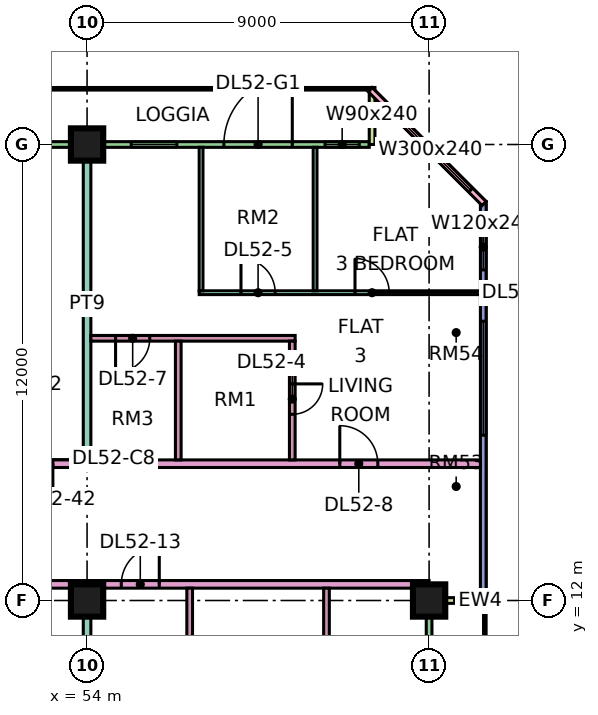
"""IFC4 building model, lengths in metres.
Left out: names, types, materials, properties, quantities, classifications, styles, units other than length and angle.
Written with IfcOpenShell. Run it as: python <this file> out.ifc"""

import sys

from ifc_helpers import new_model, si_unit, direction, frame, frame_2d, origin, origin_2d, place, context, subcontext, project, spatial, rectangle, extrude, element, fill, save


model = new_model("IFC4")
c1 = context("Model", 3, precision=1e-05, world=origin(), true_north=direction((0.0, 1.0)))
c2 = subcontext(c1, "Body", "Model", "MODEL_VIEW")
j1 = project(units=[si_unit("LENGTHUNIT", "METRE"), si_unit("PLANEANGLEUNIT", "RADIAN")], contexts=[c1])
p1 = place(None, origin())
s1 = spatial("IfcSite", under=j1, at=p1, CompositionType="ELEMENT")
p2 = place(p1, origin())
s2 = spatial("IfcBuilding", under=s1, at=p2, CompositionType="ELEMENT")
p3 = place(p2, frame((0.0, 0.0, 222.9)))
s3 = spatial("IfcBuildingStorey", under=s2, at=p3, CompositionType="ELEMENT", Elevation=222.9)
for number, where, z_axis, x_axis in (
    (1, (54.0, 12.0, 0.0), (0.0, 0.0, 1.0), (1.0, 0.0, 0.0)),
    (2, (54.0, 24.0, 0.0), (0.0, 0.0, 1.0), (1.0, 0.0, 0.0)),
    (3, (63.0, 12.0, 0.0), (0.0, 0.0, 1.0), (1.0, 0.0, 0.0)),
):
    element("IfcColumn", number, at=place(p3, frame(where, z_axis=z_axis, x_axis=x_axis)), inside=s3, PredefinedType="COLUMN", context=c2, shape_type="SweptSolid", body=[
        extrude(rectangle(XDim=0.85, YDim=0.85, at=origin_2d()), origin(), (0.0, 0.0, 1.0), 3.75),
    ])
p4 = place(p3, frame((61.425, 24.0, 0.0), z_axis=(0.0, 0.0, 1.0), x_axis=(-1.0, 0.0, 0.0)))
e4 = element("IfcWall", 4, at=p4, inside=s3, PredefinedType="SOLIDWALL", context=c2, shape_type="SweptSolid", body=[
    extrude(rectangle(XDim=13.35, YDim=0.15, at=frame_2d((6.675, 0.0))), origin(), (0.0, 0.0, 1.0), 3.35),
])
p5 = place(p4, frame((0.262, 0.0, 0.45)))
e5 = element("IfcOpeningElement", 5, at=p5, cuts=e4, PredefinedType="OPENING", context=c2, shape_type="SweptSolid", body=[
    extrude(rectangle(XDim=0.9, YDim=2.4, at=frame_2d((0.45, 1.2))), frame((0.0, 0.085, 0.0), z_axis=(0.0, -1.0, 0.0), x_axis=(1.0, 0.0, 0.0)), (0.0, 0.0, 1.0), 0.17),
])
p6 = place(p4, frame((2.025, 0.0, 0.0)))
e6 = element("IfcOpeningElement", 6, at=p6, cuts=e4, PredefinedType="OPENING", context=c2, shape_type="SweptSolid", body=[
    extrude(rectangle(XDim=1.8, YDim=2.4, at=frame_2d((0.9, 1.2))), frame((0.0, 0.085, 0.0), z_axis=(0.0, -1.0, 0.0), x_axis=(1.0, 0.0, 0.0)), (0.0, 0.0, 1.0), 0.17),
])
p7 = place(p4, frame((5.062, 0.0, 0.45)))
e7 = element("IfcOpeningElement", 7, at=p7, cuts=e4, PredefinedType="OPENING", context=c2, shape_type="SweptSolid", body=[
    extrude(rectangle(XDim=1.2, YDim=2.4, at=frame_2d((0.6, 1.2))), frame((0.0, 0.085, 0.0), z_axis=(0.0, -1.0, 0.0), x_axis=(1.0, 0.0, 0.0)), (0.0, 0.0, 1.0), 0.17),
])
p8 = place(p4, frame((8.55, 0.0, 0.45)))
e8 = element("IfcOpeningElement", 8, at=p8, cuts=e4, PredefinedType="OPENING", context=c2, shape_type="SweptSolid", body=[
    extrude(rectangle(XDim=4.2, YDim=2.4, at=frame_2d((2.1, 1.2))), frame((0.0, 0.085, 0.0), z_axis=(0.0, -1.0, 0.0), x_axis=(1.0, 0.0, 0.0)), (0.0, 0.0, 1.0), 0.17),
])
p9 = place(p3, frame((61.5, 25.5, 0.0), z_axis=(0.0, 0.0, 1.0), x_axis=(0.0, -1.0, 0.0)))
e9 = element("IfcWall", 9, at=p9, inside=s3, PredefinedType="SOLIDWALL", context=c2, shape_type="SweptSolid", body=[
    extrude(rectangle(XDim=1.5, YDim=0.15, at=frame_2d((0.75, 0.0))), origin(), (0.0, 0.0, 1.0), 3.35),
])
p10 = place(p3, frame((63.0, 1.575, 0.0), z_axis=(0.0, 0.0, 1.0), x_axis=(0.0, 1.0, 0.0)))
e10 = element("IfcWall", 10, at=p10, inside=s3, PredefinedType="SOLIDWALL", context=c2, shape_type="SweptSolid", body=[
    extrude(rectangle(XDim=10.35, YDim=0.15, at=frame_2d((5.175, 0.0))), origin(), (0.0, 0.0, 1.0), 3.35),
])
p11 = place(p10, frame((1.825, 0.0, 0.0)))
e11 = element("IfcOpeningElement", 11, at=p11, cuts=e10, PredefinedType="OPENING", context=c2, shape_type="SweptSolid", body=[
    extrude(rectangle(XDim=1.8, YDim=2.4, at=frame_2d((0.9, 1.2))), frame((0.0, 0.085, 0.0), z_axis=(0.0, -1.0, 0.0), x_axis=(1.0, 0.0, 0.0)), (0.0, 0.0, 1.0), 0.17),
])
p12 = place(p10, frame((7.075, 0.0, 0.45)))
e12 = element("IfcOpeningElement", 12, at=p12, cuts=e10, PredefinedType="OPENING", context=c2, shape_type="SweptSolid", body=[
    extrude(rectangle(XDim=2.4, YDim=2.4, at=frame_2d((1.2, 1.2))), frame((0.0, 0.085, 0.0), z_axis=(0.0, -1.0, 0.0), x_axis=(1.0, 0.0, 0.0)), (0.0, 0.0, 1.0), 0.17),
])
p13 = place(p3, frame((64.5, 12.0, 0.0), z_axis=(0.0, 0.0, 1.0), x_axis=(-1.0, 0.0, 0.0)))
e13 = element("IfcWall", 13, at=p13, inside=s3, PredefinedType="SOLIDWALL", context=c2, shape_type="SweptSolid", body=[
    extrude(rectangle(XDim=1.5, YDim=0.15, at=frame_2d((0.75, 0.0))), origin(), (0.0, 0.0, 1.0), 3.35),
])
p14 = place(p3, frame((64.425, 12.075, 0.0), z_axis=(0.0, 0.0, 1.0), x_axis=(0.0, 1.0, 0.0)))
e14 = element("IfcWall", 14, at=p14, inside=s3, PredefinedType="SOLIDWALL", context=c2, shape_type="SweptSolid", body=[
    extrude(rectangle(XDim=10.425, YDim=0.15, at=frame_2d((5.212, 0.0))), origin(), (0.0, 0.0, 1.0), 3.35),
])
p15 = place(p14, frame((4.275, 0.0, 0.45)))
e15 = element("IfcOpeningElement", 15, at=p15, cuts=e14, PredefinedType="OPENING", context=c2, shape_type="SweptSolid", body=[
    extrude(rectangle(XDim=3.0, YDim=2.4, at=frame_2d((1.5, 1.2))), frame((0.0, 0.085, 0.0), z_axis=(0.0, -1.0, 0.0), x_axis=(1.0, 0.0, 0.0)), (0.0, 0.0, 1.0), 0.17),
])
p16 = place(p14, frame((8.625, 0.0, 0.45)))
e16 = element("IfcOpeningElement", 16, at=p16, cuts=e14, PredefinedType="OPENING", context=c2, shape_type="SweptSolid", body=[
    extrude(rectangle(XDim=1.2, YDim=2.4, at=frame_2d((0.6, 1.2))), frame((0.0, 0.085, 0.0), z_axis=(0.0, -1.0, 0.0), x_axis=(1.0, 0.0, 0.0)), (0.0, 0.0, 1.0), 0.17),
])
p17 = place(p3, frame((64.447, 22.447, 0.0), z_axis=(0.0, 0.0, 1.0), x_axis=(-0.707106781187, 0.707106781187, 0.0)))
e17 = element("IfcWall", 17, at=p17, inside=s3, PredefinedType="SOLIDWALL", context=c2, shape_type="SweptSolid", body=[
    extrude(rectangle(XDim=4.243, YDim=0.15, at=frame_2d((2.121, 0.0))), origin(), (0.0, 0.0, 1.0), 3.35),
])
p18 = place(p17, frame((0.498, 0.0, 0.45)))
e18 = element("IfcOpeningElement", 18, at=p18, cuts=e17, PredefinedType="OPENING", context=c2, shape_type="SweptSolid", body=[
    extrude(rectangle(XDim=3.0, YDim=2.4, at=frame_2d((1.5, 1.2))), frame((0.0, 0.085, 0.0), z_axis=(0.0, -1.0, 0.0), x_axis=(1.0, 0.0, 0.0)), (0.0, 0.0, 1.0), 0.17),
])
p19 = place(p3, frame((40.65, 12.425, 0.0), z_axis=(0.0, 0.0, 1.0), x_axis=(1.0, 0.0, 0.0)))
e19 = element("IfcWall", 19, at=p19, inside=s3, PredefinedType="PARTITIONING", context=c2, shape_type="SweptSolid", body=[
    extrude(rectangle(XDim=22.35, YDim=0.2, at=frame_2d((11.175, 0.0))), origin(), (0.0, 0.0, 1.0), 3.35),
])
p20 = place(p19, frame((14.25, 0.0, 0.0)))
e20 = element("IfcOpeningElement", 20, at=p20, cuts=e19, PredefinedType="OPENING", context=c2, shape_type="SweptSolid", body=[
    extrude(rectangle(XDim=1.0, YDim=2.1, at=frame_2d((0.5, 1.05))), frame((0.0, 0.11, 0.0), z_axis=(0.0, -1.0, 0.0), x_axis=(1.0, 0.0, 0.0)), (0.0, 0.0, 1.0), 0.22),
])
p21 = place(p19, frame((1.05, 0.0, 0.0)))
e21 = element("IfcOpeningElement", 21, at=p21, cuts=e19, PredefinedType="OPENING", context=c2, shape_type="SweptSolid", body=[
    extrude(rectangle(XDim=1.0, YDim=2.1, at=frame_2d((0.5, 1.05))), frame((0.0, 0.11, 0.0), z_axis=(0.0, -1.0, 0.0), x_axis=(1.0, 0.0, 0.0)), (0.0, 0.0, 1.0), 0.22),
])
p22 = place(p3, frame((51.225, 15.6, 0.0), z_axis=(0.0, 0.0, 1.0), x_axis=(1.0, 0.0, 0.0)))
e22 = element("IfcWall", 22, at=p22, inside=s3, PredefinedType="PARTITIONING", context=c2, shape_type="SweptSolid", body=[
    extrude(rectangle(XDim=13.125, YDim=0.2, at=frame_2d((6.562, 0.0))), origin(), (0.0, 0.0, 1.0), 3.35),
])
p23 = place(p22, frame((9.425, 0.0, 0.0)))
e23 = element("IfcOpeningElement", 23, at=p23, cuts=e22, PredefinedType="OPENING", context=c2, shape_type="SweptSolid", body=[
    extrude(rectangle(XDim=1.0, YDim=2.1, at=frame_2d((0.5, 1.05))), frame((0.0, 0.11, 0.0), z_axis=(0.0, -1.0, 0.0), x_axis=(1.0, 0.0, 0.0)), (0.0, 0.0, 1.0), 0.22),
])
p24 = place(p22, frame((0.875, 0.0, 0.0)))
e24 = element("IfcOpeningElement", 24, at=p24, cuts=e22, PredefinedType="OPENING", context=c2, shape_type="SweptSolid", body=[
    extrude(rectangle(XDim=1.0, YDim=2.1, at=frame_2d((0.5, 1.05))), frame((0.0, 0.11, 0.0), z_axis=(0.0, -1.0, 0.0), x_axis=(1.0, 0.0, 0.0)), (0.0, 0.0, 1.0), 0.22),
])
p25 = place(p3, frame((54.0, 0.074, 0.0), z_axis=(0.0, 0.0, 1.0), x_axis=(0.0, 1.0, 0.0)))
e25 = element("IfcWall", 25, at=p25, inside=s3, PredefinedType="PARTITIONING", context=c2, shape_type="SweptSolid", body=[
    extrude(rectangle(XDim=12.251, YDim=0.2, at=frame_2d((6.125, 0.0))), origin(), (0.0, 0.0, 1.0), 3.35),
])
p26 = place(p3, frame((54.0, 15.7, 0.0), z_axis=(0.0, 0.0, 1.0), x_axis=(0.0, 1.0, 0.0)))
e26 = element("IfcWall", 26, at=p26, inside=s3, PredefinedType="PARTITIONING", context=c2, shape_type="SweptSolid", body=[
    extrude(rectangle(XDim=8.226, YDim=0.2, at=frame_2d((4.113, 0.0))), origin(), (0.0, 0.0, 1.0), 3.35),
])
p27 = place(p3, frame((54.1, 18.9, 0.0), z_axis=(0.0, 0.0, 1.0), x_axis=(1.0, 0.0, 0.0)))
e27 = element("IfcWall", 27, at=p27, inside=s3, PredefinedType="PARTITIONING", context=c2, shape_type="SweptSolid", body=[
    extrude(rectangle(XDim=5.375, YDim=0.15, at=frame_2d((2.688, 0.0))), origin(), (0.0, 0.0, 1.0), 3.35),
])
p28 = place(p27, frame((0.65, 0.0, 0.0)))
e28 = element("IfcOpeningElement", 28, at=p28, cuts=e27, PredefinedType="OPENING", context=c2, shape_type="SweptSolid", body=[
    extrude(rectangle(XDim=0.9, YDim=2.1, at=frame_2d((0.45, 1.05))), frame((0.0, 0.085, 0.0), z_axis=(0.0, -1.0, 0.0), x_axis=(1.0, 0.0, 0.0)), (0.0, 0.0, 1.0), 0.17),
])
p29 = place(p3, frame((56.4, 15.7, 0.0), z_axis=(0.0, 0.0, 1.0), x_axis=(0.0, 1.0, 0.0)))
e29 = element("IfcWall", 29, at=p29, inside=s3, PredefinedType="PARTITIONING", context=c2, shape_type="SweptSolid", body=[
    extrude(rectangle(XDim=3.125, YDim=0.15, at=frame_2d((1.562, 0.0))), origin(), (0.0, 0.0, 1.0), 3.35),
])
p30 = place(p3, frame((56.7, 8.3, 0.0), z_axis=(0.0, 0.0, 1.0), x_axis=(0.0, 1.0, 0.0)))
e30 = element("IfcWall", 30, at=p30, inside=s3, PredefinedType="PARTITIONING", context=c2, shape_type="SweptSolid", body=[
    extrude(rectangle(XDim=4.025, YDim=0.15, at=frame_2d((2.012, 0.0))), origin(), (0.0, 0.0, 1.0), 3.35),
])
p31 = place(p3, frame((56.95, 20.1, 0.0), z_axis=(0.0, 0.0, 1.0), x_axis=(1.0, 0.0, 0.0)))
e31 = element("IfcWall", 31, at=p31, inside=s3, PredefinedType="PARTITIONING", context=c2, shape_type="SweptSolid", body=[
    extrude(rectangle(XDim=7.4, YDim=0.1, at=frame_2d((3.7, 0.0))), origin(), (0.0, 0.0, 1.0), 3.35),
])
p32 = place(p31, frame((1.1, 0.0, 0.0)))
e32 = element("IfcOpeningElement", 32, at=p32, cuts=e31, PredefinedType="OPENING", context=c2, shape_type="SweptSolid", body=[
    extrude(rectangle(XDim=0.9, YDim=2.1, at=frame_2d((0.45, 1.05))), frame((0.0, 0.06, 0.0), z_axis=(0.0, -1.0, 0.0), x_axis=(1.0, 0.0, 0.0)), (0.0, 0.0, 1.0), 0.12),
])
p33 = place(p31, frame((4.1, 0.0, 0.0)))
e33 = element("IfcOpeningElement", 33, at=p33, cuts=e31, PredefinedType="OPENING", context=c2, shape_type="SweptSolid", body=[
    extrude(rectangle(XDim=0.9, YDim=2.1, at=frame_2d((0.45, 1.05))), frame((0.0, 0.06, 0.0), z_axis=(0.0, -1.0, 0.0), x_axis=(1.0, 0.0, 0.0)), (0.0, 0.0, 1.0), 0.12),
])
p34 = place(p3, frame((57.0, 20.15, 0.0), z_axis=(0.0, 0.0, 1.0), x_axis=(0.0, 1.0, 0.0)))
e34 = element("IfcWall", 34, at=p34, inside=s3, PredefinedType="PARTITIONING", context=c2, shape_type="SweptSolid", body=[
    extrude(rectangle(XDim=3.776, YDim=0.1, at=frame_2d((1.888, 0.0))), origin(), (0.0, 0.0, 1.0), 3.35),
])
p35 = place(p3, frame((59.4, 15.7, 0.0), z_axis=(0.0, 0.0, 1.0), x_axis=(0.0, 1.0, 0.0)))
e35 = element("IfcWall", 35, at=p35, inside=s3, PredefinedType="PARTITIONING", context=c2, shape_type="SweptSolid", body=[
    extrude(rectangle(XDim=3.125, YDim=0.15, at=frame_2d((1.562, 0.0))), origin(), (0.0, 0.0, 1.0), 3.35),
])
p36 = place(p35, frame((1.2, 0.0, 0.0)))
e36 = element("IfcOpeningElement", 36, at=p36, cuts=e35, PredefinedType="OPENING", context=c2, shape_type="SweptSolid", body=[
    extrude(rectangle(XDim=0.8, YDim=2.1, at=frame_2d((0.4, 1.05))), frame((0.0, 0.085, 0.0), z_axis=(0.0, -1.0, 0.0), x_axis=(1.0, 0.0, 0.0)), (0.0, 0.0, 1.0), 0.17),
])
p37 = place(p3, frame((60.0, 20.15, 0.0), z_axis=(0.0, 0.0, 1.0), x_axis=(0.0, 1.0, 0.0)))
e37 = element("IfcWall", 37, at=p37, inside=s3, PredefinedType="PARTITIONING", context=c2, shape_type="SweptSolid", body=[
    extrude(rectangle(XDim=3.776, YDim=0.1, at=frame_2d((1.888, 0.0))), origin(), (0.0, 0.0, 1.0), 3.35),
])
p38 = place(p3, frame((60.3, 8.3, 0.0), z_axis=(0.0, 0.0, 1.0), x_axis=(0.0, 1.0, 0.0)))
e38 = element("IfcWall", 38, at=p38, inside=s3, PredefinedType="PARTITIONING", context=c2, shape_type="SweptSolid", body=[
    extrude(rectangle(XDim=4.025, YDim=0.15, at=frame_2d((2.012, 0.0))), origin(), (0.0, 0.0, 1.0), 3.35),
])
p39 = place(p5, origin())
e39 = element("IfcWindow", 39, at=p39, inside=s3, PartitioningType="SINGLE_PANEL", PredefinedType="WINDOW", context=c2, shape_type="SweptSolid", body=[
    extrude(rectangle(XDim=0.9, YDim=2.4, at=frame_2d((0.45, 1.2))), frame((0.0, 0.03, 0.0), z_axis=(0.0, -1.0, 0.0), x_axis=(1.0, 0.0, 0.0)), (0.0, 0.0, 1.0), 0.06),
])
fill(e5, e39)
p40 = place(p6, frame((1.8, 0.0, 0.0), z_axis=(0.0, 0.0, 1.0), x_axis=(-1.0, 0.0, 0.0)))
e40 = element("IfcDoor", 40, at=p40, inside=s3, OperationType="DOUBLE_DOOR_SINGLE_SWING", PredefinedType="DOOR", context=c2, shape_type="SweptSolid", body=[
    extrude(rectangle(XDim=1.8, YDim=2.4, at=frame_2d((0.9, 1.2))), frame((0.0, 0.025, 0.0), z_axis=(0.0, -1.0, 0.0), x_axis=(1.0, 0.0, 0.0)), (0.0, 0.0, 1.0), 0.05),
])
fill(e6, e40)
p41 = place(p7, origin())
e41 = element("IfcWindow", 41, at=p41, inside=s3, PartitioningType="SINGLE_PANEL", PredefinedType="WINDOW", context=c2, shape_type="SweptSolid", body=[
    extrude(rectangle(XDim=1.2, YDim=2.4, at=frame_2d((0.6, 1.2))), frame((0.0, 0.03, 0.0), z_axis=(0.0, -1.0, 0.0), x_axis=(1.0, 0.0, 0.0)), (0.0, 0.0, 1.0), 0.06),
])
fill(e7, e41)
p42 = place(p15, origin())
e42 = element("IfcWindow", 42, at=p42, inside=s3, PartitioningType="SINGLE_PANEL", PredefinedType="WINDOW", context=c2, shape_type="SweptSolid", body=[
    extrude(rectangle(XDim=3.0, YDim=2.4, at=frame_2d((1.5, 1.2))), frame((0.0, 0.03, 0.0), z_axis=(0.0, -1.0, 0.0), x_axis=(1.0, 0.0, 0.0)), (0.0, 0.0, 1.0), 0.06),
])
fill(e15, e42)
p43 = place(p16, origin())
e43 = element("IfcWindow", 43, at=p43, inside=s3, PartitioningType="SINGLE_PANEL", PredefinedType="WINDOW", context=c2, shape_type="SweptSolid", body=[
    extrude(rectangle(XDim=1.2, YDim=2.4, at=frame_2d((0.6, 1.2))), frame((0.0, 0.03, 0.0), z_axis=(0.0, -1.0, 0.0), x_axis=(1.0, 0.0, 0.0)), (0.0, 0.0, 1.0), 0.06),
])
fill(e16, e43)
p44 = place(p18, origin())
e44 = element("IfcWindow", 44, at=p44, inside=s3, PartitioningType="SINGLE_PANEL", PredefinedType="WINDOW", context=c2, shape_type="SweptSolid", body=[
    extrude(rectangle(XDim=3.0, YDim=2.4, at=frame_2d((1.5, 1.2))), frame((0.0, 0.03, 0.0), z_axis=(0.0, -1.0, 0.0), x_axis=(1.0, 0.0, 0.0)), (0.0, 0.0, 1.0), 0.06),
])
fill(e18, e44)
p45 = place(p36, origin())
e45 = element("IfcDoor", 45, at=p45, inside=s3, OperationType="SINGLE_SWING_RIGHT", PredefinedType="DOOR", context=c2, shape_type="SweptSolid", body=[
    extrude(rectangle(XDim=0.8, YDim=2.1, at=frame_2d((0.4, 1.05))), frame((0.0, 0.025, 0.0), z_axis=(0.0, -1.0, 0.0), x_axis=(1.0, 0.0, 0.0)), (0.0, 0.0, 1.0), 0.05),
])
fill(e36, e45)
p46 = place(p32, origin())
e46 = element("IfcDoor", 46, at=p46, inside=s3, OperationType="SINGLE_SWING_LEFT", PredefinedType="DOOR", context=c2, shape_type="SweptSolid", body=[
    extrude(rectangle(XDim=0.9, YDim=2.1, at=frame_2d((0.45, 1.05))), frame((0.0, 0.025, 0.0), z_axis=(0.0, -1.0, 0.0), x_axis=(1.0, 0.0, 0.0)), (0.0, 0.0, 1.0), 0.05),
])
fill(e32, e46)
p47 = place(p33, origin())
e47 = element("IfcDoor", 47, at=p47, inside=s3, OperationType="SINGLE_SWING_LEFT", PredefinedType="DOOR", context=c2, shape_type="SweptSolid", body=[
    extrude(rectangle(XDim=0.9, YDim=2.1, at=frame_2d((0.45, 1.05))), frame((0.0, 0.025, 0.0), z_axis=(0.0, -1.0, 0.0), x_axis=(1.0, 0.0, 0.0)), (0.0, 0.0, 1.0), 0.05),
])
fill(e33, e47)
p48 = place(p28, frame((0.9, 0.0, 0.0), z_axis=(0.0, 0.0, 1.0), x_axis=(-1.0, 0.0, 0.0)))
e48 = element("IfcDoor", 48, at=p48, inside=s3, OperationType="SINGLE_SWING_LEFT", PredefinedType="DOOR", context=c2, shape_type="SweptSolid", body=[
    extrude(rectangle(XDim=0.9, YDim=2.1, at=frame_2d((0.45, 1.05))), frame((0.0, 0.025, 0.0), z_axis=(0.0, -1.0, 0.0), x_axis=(1.0, 0.0, 0.0)), (0.0, 0.0, 1.0), 0.05),
])
fill(e28, e48)
p49 = place(p23, origin())
e49 = element("IfcDoor", 49, at=p49, inside=s3, OperationType="SINGLE_SWING_LEFT", PredefinedType="DOOR", context=c2, shape_type="SweptSolid", body=[
    extrude(rectangle(XDim=1.0, YDim=2.1, at=frame_2d((0.5, 1.05))), frame((0.0, 0.025, 0.0), z_axis=(0.0, -1.0, 0.0), x_axis=(1.0, 0.0, 0.0)), (0.0, 0.0, 1.0), 0.05),
])
fill(e23, e49)
p50 = place(p20, frame((1.0, 0.0, 0.0), z_axis=(0.0, 0.0, 1.0), x_axis=(-1.0, 0.0, 0.0)))
e50 = element("IfcDoor", 50, at=p50, inside=s3, OperationType="SINGLE_SWING_RIGHT", PredefinedType="DOOR", context=c2, shape_type="SweptSolid", body=[
    extrude(rectangle(XDim=1.0, YDim=2.1, at=frame_2d((0.5, 1.05))), frame((0.0, 0.025, 0.0), z_axis=(0.0, -1.0, 0.0), x_axis=(1.0, 0.0, 0.0)), (0.0, 0.0, 1.0), 0.05),
])
fill(e20, e50)
p51 = place(p24, origin())
e51 = element("IfcDoor", 51, at=p51, inside=s3, OperationType="SINGLE_SWING_RIGHT", PredefinedType="DOOR", context=c2, shape_type="SweptSolid", body=[
    extrude(rectangle(XDim=1.0, YDim=2.1, at=frame_2d((0.5, 1.05))), frame((0.0, 0.025, 0.0), z_axis=(0.0, -1.0, 0.0), x_axis=(1.0, 0.0, 0.0)), (0.0, 0.0, 1.0), 0.05),
])
fill(e24, e51)
save(model, sys.argv[1])
